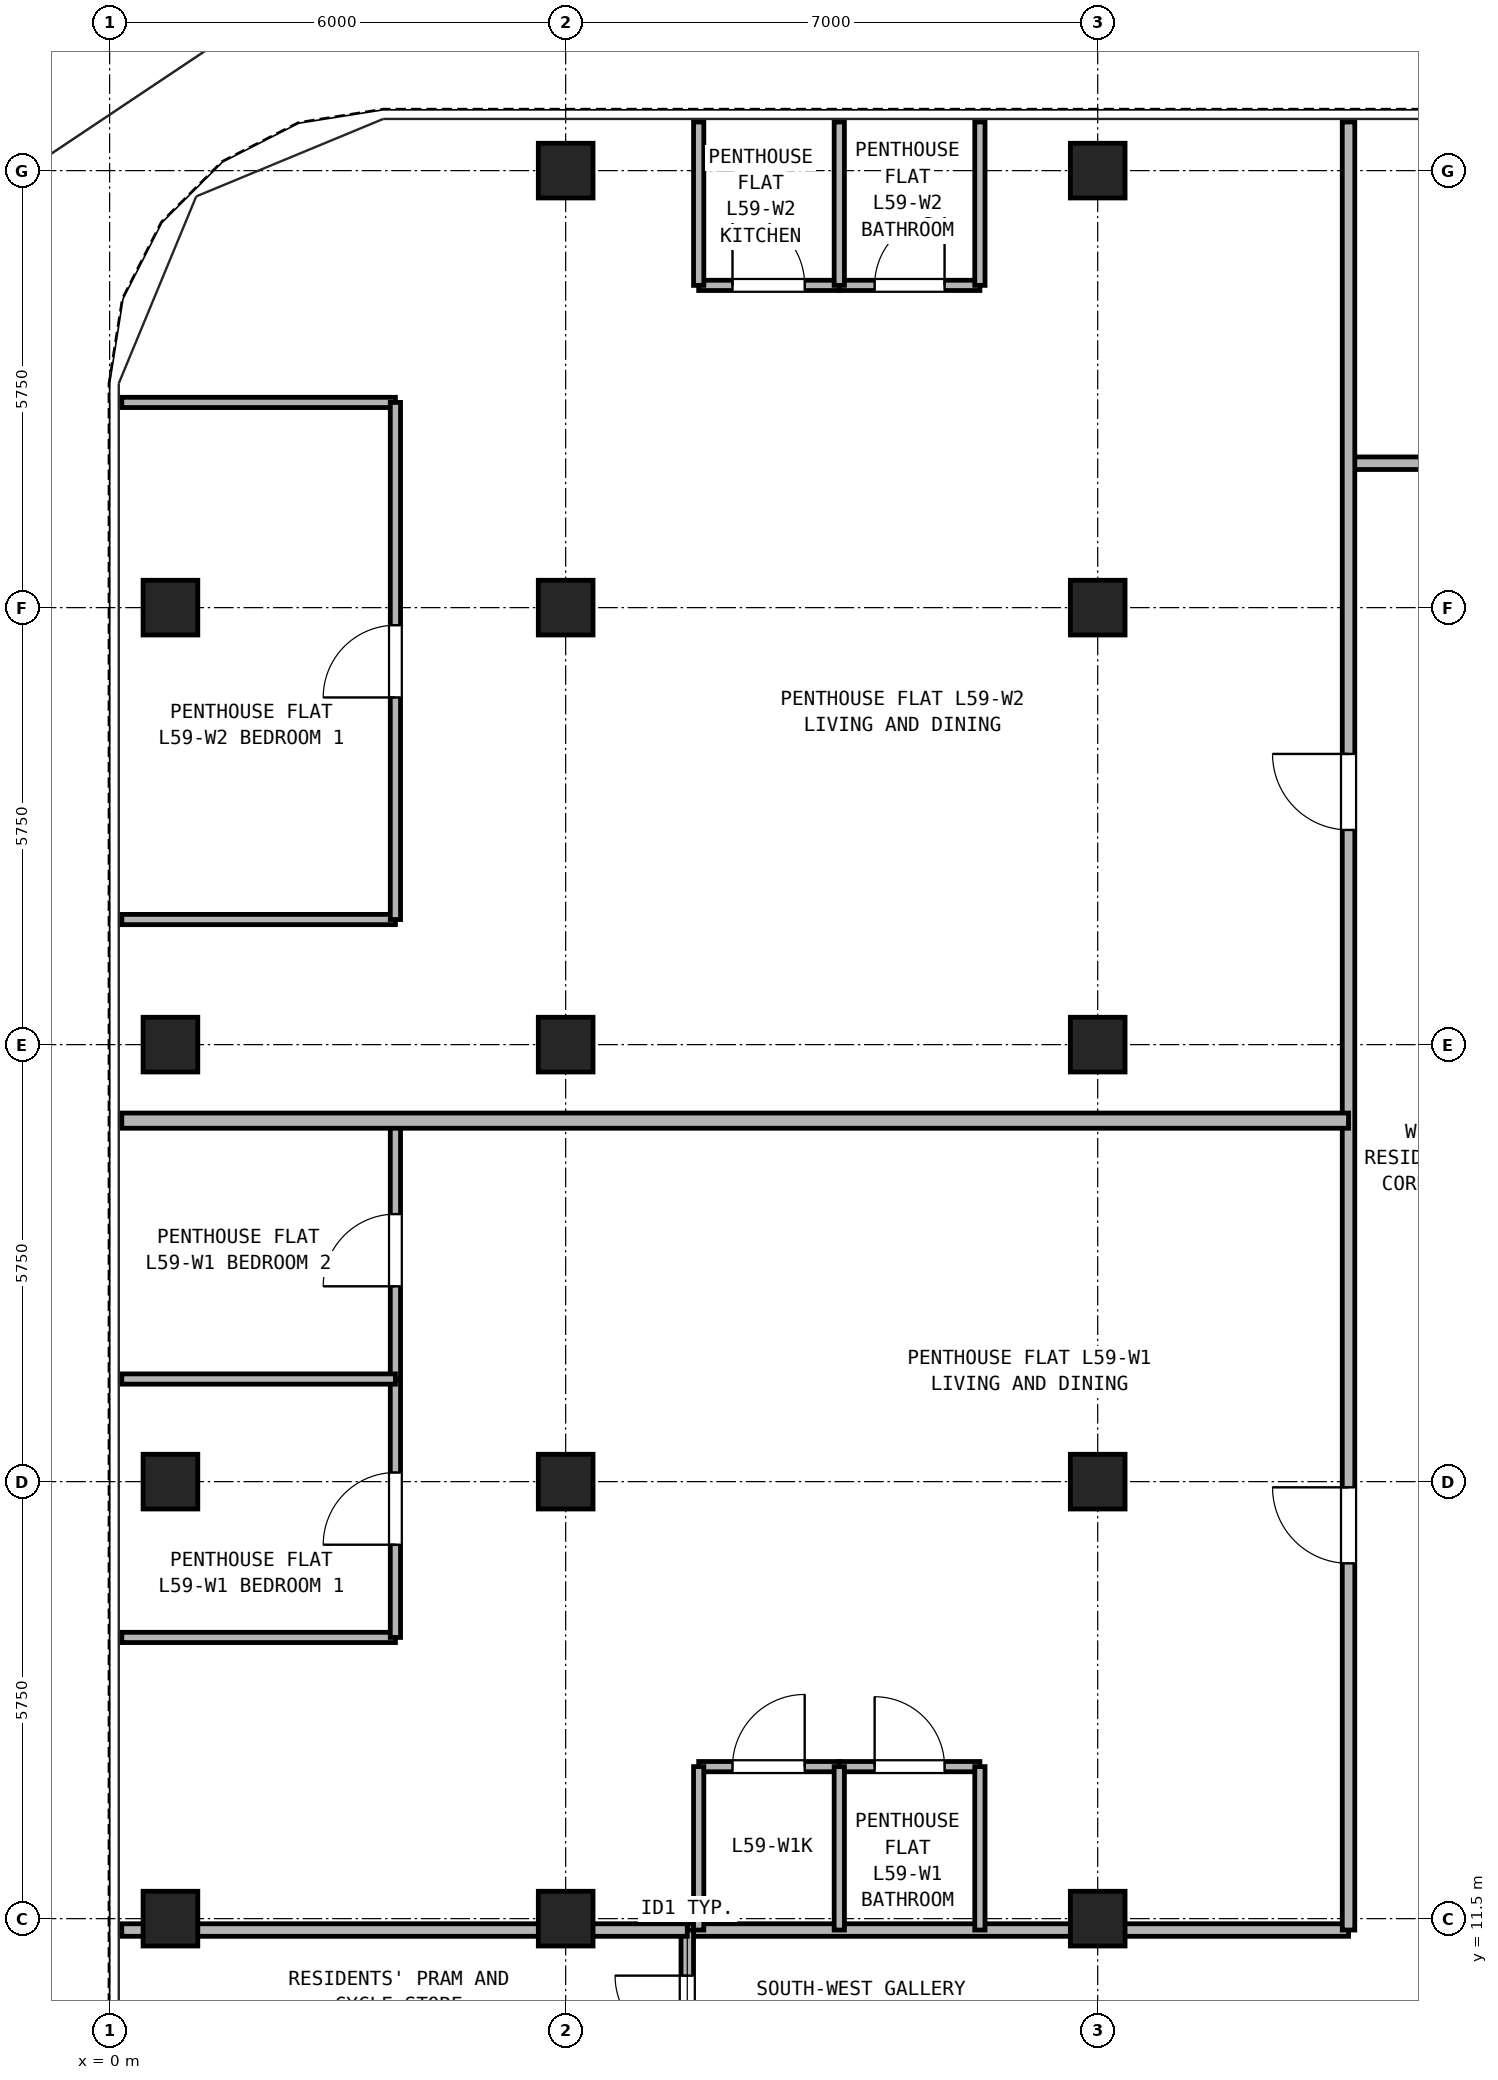
"""IFC4 building model, lengths in metres.
Left out: names, types, materials, properties, quantities, classifications, styles, units other than length and angle.
Written with IfcOpenShell. Run it as: python <this file> out.ifc"""

import sys

from ifc_helpers import new_model, si_unit, direction, frame, frame_2d, origin, origin_2d, place, context, subcontext, project, spatial, rectangle, hollow_rectangle, extrude, source, transform, mapped, element, fill, save


model = new_model("IFC4")
c1 = context("Model", 3, precision=1e-05, world=origin(), true_north=direction((0.0, 1.0)))
c2 = subcontext(c1, "Body", "Model", "MODEL_VIEW")
j1 = project(units=[si_unit("LENGTHUNIT", "METRE"), si_unit("PLANEANGLEUNIT", "RADIAN")], contexts=[c1])
p1 = place(None, origin())
s1 = spatial("IfcSite", under=j1, at=p1, CompositionType="ELEMENT")
p2 = place(p1, origin())
s2 = spatial("IfcBuilding", under=s1, at=p2, CompositionType="ELEMENT")
p3 = place(p2, frame((0.0, 0.0, 209.2)))
s3 = spatial("IfcBuildingStorey", under=s2, at=p3, CompositionType="ELEMENT", Elevation=209.2)
m1 = source(origin(), c2, "Body", "SweptSolid", [
    extrude(hollow_rectangle(XDim=0.72, YDim=0.72, WallThickness=0.04, at=origin_2d()), origin(), (0.0, 0.0, 1.0), 2.95),
])
for number, where, z_axis, x_axis in (
    (1, (6.0, 34.5, 0.0), (0.0, 0.0, 1.0), (1.0, 0.0, 0.0)),
    (2, (13.0, 34.5, 0.0), (0.0, 0.0, 1.0), (1.0, 0.0, 0.0)),
    (3, (0.8, 11.5, 0.0), (0.0, 0.0, 1.0), (1.0, 0.0, 0.0)),
    (4, (0.8, 17.25, 0.0), (0.0, 0.0, 1.0), (1.0, 0.0, 0.0)),
    (5, (0.8, 23.0, 0.0), (0.0, 0.0, 1.0), (1.0, 0.0, 0.0)),
    (6, (0.8, 28.75, 0.0), (0.0, 0.0, 1.0), (1.0, 0.0, 0.0)),
    (7, (6.0, 11.5, 0.0), (0.0, 0.0, 1.0), (1.0, 0.0, 0.0)),
    (8, (6.0, 17.25, 0.0), (0.0, 0.0, 1.0), (1.0, 0.0, 0.0)),
    (9, (6.0, 23.0, 0.0), (0.0, 0.0, 1.0), (1.0, 0.0, 0.0)),
    (10, (6.0, 28.75, 0.0), (0.0, 0.0, 1.0), (1.0, 0.0, 0.0)),
    (11, (13.0, 11.5, 0.0), (0.0, 0.0, 1.0), (1.0, 0.0, 0.0)),
    (12, (13.0, 17.25, 0.0), (0.0, 0.0, 1.0), (1.0, 0.0, 0.0)),
    (13, (13.0, 23.0, 0.0), (0.0, 0.0, 1.0), (1.0, 0.0, 0.0)),
    (14, (13.0, 28.75, 0.0), (0.0, 0.0, 1.0), (1.0, 0.0, 0.0)),
):
    element("IfcColumn", number, at=place(p3, frame(where, z_axis=z_axis, x_axis=x_axis)), inside=s3, PredefinedType="COLUMN", context=c2, shape_type="MappedRepresentation", body=[
        mapped(m1, transform((0.0, 0.0, 0.0), x_axis=(1.0, 0.0, 0.0), y_axis=(0.0, 1.0, 0.0), z_axis=(0.0, 0.0, 1.0), scale=1.0)),
    ])
p4 = place(p3, frame((7.6, 11.35, 0.0), z_axis=(0.0, 0.0, 1.0), x_axis=(1.0, 0.0, 0.0)))
e15 = element("IfcWall", 15, at=p4, inside=s3, PredefinedType="PARTITIONING", context=c2, shape_type="SweptSolid", body=[
    extrude(rectangle(XDim=8.7, YDim=0.165, at=frame_2d((4.35, 0.0))), origin(), (0.0, 0.0, 1.0), 2.323),
])
p5 = place(p3, frame((7.6, 9.35, 0.0), z_axis=(0.0, 0.0, 1.0), x_axis=(0.0, 1.0, 0.0)))
e16 = element("IfcWall", 16, at=p5, inside=s3, PredefinedType="PARTITIONING", context=c2, shape_type="SweptSolid", body=[
    extrude(rectangle(XDim=2.0, YDim=0.165, at=frame_2d((1.0, 0.0))), origin(), (0.0, 0.0, 1.0), 2.95),
])
p6 = place(p5, frame((0.45, 0.0, 0.0)))
e17 = element("IfcOpeningElement", 17, at=p6, cuts=e16, PredefinedType="OPENING", context=c2, shape_type="SweptSolid", body=[
    extrude(rectangle(XDim=0.95, YDim=2.15, at=frame_2d((0.475, 1.075))), frame((0.0, 0.093, 0.0), z_axis=(0.0, -1.0, 0.0), x_axis=(1.0, 0.0, 0.0)), (0.0, 0.0, 1.0), 0.185),
])
p7 = place(p3, frame((16.3, 30.65, 0.0), z_axis=(0.0, 0.0, 1.0), x_axis=(1.0, 0.0, 0.0)))
e18 = element("IfcWall", 18, at=p7, inside=s3, PredefinedType="PARTITIONING", context=c2, shape_type="SweptSolid", body=[
    extrude(rectangle(XDim=14.4, YDim=0.165, at=frame_2d((7.2, 0.0))), origin(), (0.0, 0.0, 1.0), 2.95),
])
p8 = place(p7, frame((3.1, 0.0, 0.0)))
e19 = element("IfcOpeningElement", 19, at=p8, cuts=e18, PredefinedType="OPENING", context=c2, shape_type="SweptSolid", body=[
    extrude(rectangle(XDim=0.95, YDim=2.15, at=frame_2d((0.475, 1.075))), frame((0.0, 0.093, 0.0), z_axis=(0.0, -1.0, 0.0), x_axis=(1.0, 0.0, 0.0)), (0.0, 0.0, 1.0), 0.185),
])
p9 = place(p7, frame((8.0, 0.0, 0.0)))
e20 = element("IfcOpeningElement", 20, at=p9, cuts=e18, PredefinedType="OPENING", context=c2, shape_type="SweptSolid", body=[
    extrude(rectangle(XDim=0.95, YDim=2.15, at=frame_2d((0.475, 1.075))), frame((0.0, 0.093, 0.0), z_axis=(0.0, -1.0, 0.0), x_axis=(1.0, 0.0, 0.0)), (0.0, 0.0, 1.0), 0.185),
])
p10 = place(p7, frame((11.6, 0.0, 0.0)))
e21 = element("IfcOpeningElement", 21, at=p10, cuts=e18, PredefinedType="OPENING", context=c2, shape_type="SweptSolid", body=[
    extrude(rectangle(XDim=0.92, YDim=2.1, at=frame_2d((0.46, 1.05))), frame((0.0, 0.093, 0.0), z_axis=(0.0, -1.0, 0.0), x_axis=(1.0, 0.0, 0.0)), (0.0, 0.0, 1.0), 0.185),
])
p11 = place(p3, frame((16.3, 11.35, 0.0), z_axis=(0.0, 0.0, 1.0), x_axis=(0.0, 1.0, 0.0)))
e22 = element("IfcWall", 22, at=p11, inside=s3, PredefinedType="PARTITIONING", context=c2, shape_type="SweptSolid", body=[
    extrude(rectangle(XDim=23.79, YDim=0.165, at=frame_2d((11.895, 0.0))), origin(), (0.0, 0.0, 1.0), 2.95),
])
p12 = place(p11, frame((4.825, 0.0, 0.0)))
e23 = element("IfcOpeningElement", 23, at=p12, cuts=e22, PredefinedType="OPENING", context=c2, shape_type="SweptSolid", body=[
    extrude(rectangle(XDim=1.0, YDim=2.15, at=frame_2d((0.5, 1.075))), frame((0.0, 0.093, 0.0), z_axis=(0.0, -1.0, 0.0), x_axis=(1.0, 0.0, 0.0)), (0.0, 0.0, 1.0), 0.185),
])
p13 = place(p11, frame((14.475, 0.0, 0.0)))
e24 = element("IfcOpeningElement", 24, at=p13, cuts=e22, PredefinedType="OPENING", context=c2, shape_type="SweptSolid", body=[
    extrude(rectangle(XDim=1.0, YDim=2.15, at=frame_2d((0.5, 1.075))), frame((0.0, 0.093, 0.0), z_axis=(0.0, -1.0, 0.0), x_axis=(1.0, 0.0, 0.0)), (0.0, 0.0, 1.0), 0.185),
])
p14 = place(p3, frame((0.16, 11.35, 0.0), z_axis=(0.0, 0.0, 1.0), x_axis=(1.0, 0.0, 0.0)))
e25 = element("IfcWall", 25, at=p14, inside=s3, PredefinedType="PARTITIONING", context=c2, shape_type="SweptSolid", body=[
    extrude(rectangle(XDim=7.44, YDim=0.165, at=frame_2d((3.72, 0.0))), origin(), (0.0, 0.0, 1.0), 2.323),
])
p15 = place(p3, frame((7.75, 13.5, 0.0), z_axis=(0.0, 0.0, 1.0), x_axis=(1.0, 0.0, 0.0)))
e26 = element("IfcWall", 26, at=p15, inside=s3, PredefinedType="PARTITIONING", context=c2, shape_type="SweptSolid", body=[
    extrude(rectangle(XDim=1.85, YDim=0.135, at=frame_2d((0.925, 0.0))), origin(), (0.0, 0.0, 1.0), 2.95),
])
p16 = place(p15, frame((0.445, 0.0, 0.0)))
e27 = element("IfcOpeningElement", 27, at=p16, cuts=e26, PredefinedType="OPENING", context=c2, shape_type="SweptSolid", body=[
    extrude(rectangle(XDim=0.95, YDim=2.15, at=frame_2d((0.475, 1.075))), frame((0.0, 0.077, 0.0), z_axis=(0.0, -1.0, 0.0), x_axis=(1.0, 0.0, 0.0)), (0.0, 0.0, 1.0), 0.155),
])
p17 = place(p3, frame((9.6, 13.5, 0.0), z_axis=(0.0, 0.0, 1.0), x_axis=(1.0, 0.0, 0.0)))
e28 = element("IfcWall", 28, at=p17, inside=s3, PredefinedType="PARTITIONING", context=c2, shape_type="SweptSolid", body=[
    extrude(rectangle(XDim=1.85, YDim=0.135, at=frame_2d((0.925, 0.0))), origin(), (0.0, 0.0, 1.0), 2.95),
])
p18 = place(p17, frame((0.465, 0.0, 0.0)))
e29 = element("IfcOpeningElement", 29, at=p18, cuts=e28, PredefinedType="OPENING", context=c2, shape_type="SweptSolid", body=[
    extrude(rectangle(XDim=0.92, YDim=2.1, at=frame_2d((0.46, 1.05))), frame((0.0, 0.077, 0.0), z_axis=(0.0, -1.0, 0.0), x_axis=(1.0, 0.0, 0.0)), (0.0, 0.0, 1.0), 0.155),
])
for number, where, z_axis, x_axis in (
    (30, (7.75, 11.35, 0.0), (0.0, 0.0, 1.0), (0.0, 1.0, 0.0)),
    (31, (9.6, 11.35, 0.0), (0.0, 0.0, 1.0), (0.0, 1.0, 0.0)),
    (32, (11.45, 11.35, 0.0), (0.0, 0.0, 1.0), (0.0, 1.0, 0.0)),
):
    element("IfcWall", number, at=place(p3, frame(where, z_axis=z_axis, x_axis=x_axis)), inside=s3, PredefinedType="PARTITIONING", context=c2, shape_type="SweptSolid", body=[
        extrude(rectangle(XDim=2.15, YDim=0.135, at=frame_2d((1.075, 0.0))), origin(), (0.0, 0.0, 1.0), 2.95),
    ])
p19 = place(p3, frame((0.16, 15.2, 0.0), z_axis=(0.0, 0.0, 1.0), x_axis=(1.0, 0.0, 0.0)))
e33 = element("IfcWall", 33, at=p19, inside=s3, PredefinedType="PARTITIONING", context=c2, shape_type="SweptSolid", body=[
    extrude(rectangle(XDim=3.6, YDim=0.135, at=frame_2d((1.8, 0.0))), origin(), (0.0, 0.0, 1.0), 2.95),
])
p20 = place(p3, frame((3.76, 15.2, 0.0), z_axis=(0.0, 0.0, 1.0), x_axis=(0.0, 1.0, 0.0)))
e34 = element("IfcWall", 34, at=p20, inside=s3, PredefinedType="PARTITIONING", context=c2, shape_type="SweptSolid", body=[
    extrude(rectangle(XDim=3.4, YDim=0.135, at=frame_2d((1.7, 0.0))), origin(), (0.0, 0.0, 1.0), 2.95),
])
p21 = place(p20, frame((1.22, 0.0, 0.0)))
e35 = element("IfcOpeningElement", 35, at=p21, cuts=e34, PredefinedType="OPENING", context=c2, shape_type="SweptSolid", body=[
    extrude(rectangle(XDim=0.95, YDim=2.15, at=frame_2d((0.475, 1.075))), frame((0.0, 0.077, 0.0), z_axis=(0.0, -1.0, 0.0), x_axis=(1.0, 0.0, 0.0)), (0.0, 0.0, 1.0), 0.155),
])
p22 = place(p3, frame((3.76, 18.6, 0.0), z_axis=(0.0, 0.0, 1.0), x_axis=(0.0, 1.0, 0.0)))
e36 = element("IfcWall", 36, at=p22, inside=s3, PredefinedType="PARTITIONING", context=c2, shape_type="SweptSolid", body=[
    extrude(rectangle(XDim=3.4, YDim=0.135, at=frame_2d((1.7, 0.0))), origin(), (0.0, 0.0, 1.0), 2.95),
])
p23 = place(p22, frame((1.22, 0.0, 0.0)))
e37 = element("IfcOpeningElement", 37, at=p23, cuts=e36, PredefinedType="OPENING", context=c2, shape_type="SweptSolid", body=[
    extrude(rectangle(XDim=0.95, YDim=2.15, at=frame_2d((0.475, 1.075))), frame((0.0, 0.077, 0.0), z_axis=(0.0, -1.0, 0.0), x_axis=(1.0, 0.0, 0.0)), (0.0, 0.0, 1.0), 0.155),
])
p24 = place(p3, frame((0.16, 18.6, 0.0), z_axis=(0.0, 0.0, 1.0), x_axis=(1.0, 0.0, 0.0)))
e38 = element("IfcWall", 38, at=p24, inside=s3, PredefinedType="PARTITIONING", context=c2, shape_type="SweptSolid", body=[
    extrude(rectangle(XDim=3.6, YDim=0.135, at=frame_2d((1.8, 0.0))), origin(), (0.0, 0.0, 1.0), 2.95),
])
p25 = place(p3, frame((0.16, 22.0, 0.0), z_axis=(0.0, 0.0, 1.0), x_axis=(1.0, 0.0, 0.0)))
e39 = element("IfcWall", 39, at=p25, inside=s3, PredefinedType="PARTITIONING", context=c2, shape_type="SweptSolid", body=[
    extrude(rectangle(XDim=16.14, YDim=0.2, at=frame_2d((8.07, 0.0))), origin(), (0.0, 0.0, 1.0), 2.95),
])
p26 = place(p3, frame((7.75, 32.99, 0.0), z_axis=(0.0, 0.0, 1.0), x_axis=(1.0, 0.0, 0.0)))
e40 = element("IfcWall", 40, at=p26, inside=s3, PredefinedType="PARTITIONING", context=c2, shape_type="SweptSolid", body=[
    extrude(rectangle(XDim=1.85, YDim=0.135, at=frame_2d((0.925, 0.0))), origin(), (0.0, 0.0, 1.0), 2.95),
])
p27 = place(p26, frame((0.445, 0.0, 0.0)))
e41 = element("IfcOpeningElement", 41, at=p27, cuts=e40, PredefinedType="OPENING", context=c2, shape_type="SweptSolid", body=[
    extrude(rectangle(XDim=0.95, YDim=2.15, at=frame_2d((0.475, 1.075))), frame((0.0, 0.077, 0.0), z_axis=(0.0, -1.0, 0.0), x_axis=(1.0, 0.0, 0.0)), (0.0, 0.0, 1.0), 0.155),
])
p28 = place(p3, frame((9.6, 32.99, 0.0), z_axis=(0.0, 0.0, 1.0), x_axis=(1.0, 0.0, 0.0)))
e42 = element("IfcWall", 42, at=p28, inside=s3, PredefinedType="PARTITIONING", context=c2, shape_type="SweptSolid", body=[
    extrude(rectangle(XDim=1.85, YDim=0.135, at=frame_2d((0.925, 0.0))), origin(), (0.0, 0.0, 1.0), 2.95),
])
p29 = place(p28, frame((0.465, 0.0, 0.0)))
e43 = element("IfcOpeningElement", 43, at=p29, cuts=e42, PredefinedType="OPENING", context=c2, shape_type="SweptSolid", body=[
    extrude(rectangle(XDim=0.92, YDim=2.1, at=frame_2d((0.46, 1.05))), frame((0.0, 0.077, 0.0), z_axis=(0.0, -1.0, 0.0), x_axis=(1.0, 0.0, 0.0)), (0.0, 0.0, 1.0), 0.155),
])
for number, where, z_axis, x_axis in (
    (44, (7.75, 32.99, 0.0), (0.0, 0.0, 1.0), (0.0, 1.0, 0.0)),
    (45, (9.6, 32.99, 0.0), (0.0, 0.0, 1.0), (0.0, 1.0, 0.0)),
    (46, (11.45, 32.99, 0.0), (0.0, 0.0, 1.0), (0.0, 1.0, 0.0)),
):
    element("IfcWall", number, at=place(p3, frame(where, z_axis=z_axis, x_axis=x_axis)), inside=s3, PredefinedType="PARTITIONING", context=c2, shape_type="SweptSolid", body=[
        extrude(rectangle(XDim=2.15, YDim=0.135, at=frame_2d((1.075, 0.0))), origin(), (0.0, 0.0, 1.0), 2.95),
    ])
for number, where, z_axis, x_axis in (
    (47, (0.16, 24.646, 0.0), (0.0, 0.0, 1.0), (1.0, 0.0, 0.0)),
    (48, (0.16, 31.45, 0.0), (0.0, 0.0, 1.0), (1.0, 0.0, 0.0)),
):
    element("IfcWall", number, at=place(p3, frame(where, z_axis=z_axis, x_axis=x_axis)), inside=s3, PredefinedType="PARTITIONING", context=c2, shape_type="SweptSolid", body=[
        extrude(rectangle(XDim=3.6, YDim=0.135, at=frame_2d((1.8, 0.0))), origin(), (0.0, 0.0, 1.0), 2.95),
    ])
p30 = place(p3, frame((3.76, 24.646, 0.0), z_axis=(0.0, 0.0, 1.0), x_axis=(0.0, 1.0, 0.0)))
e49 = element("IfcWall", 49, at=p30, inside=s3, PredefinedType="PARTITIONING", context=c2, shape_type="SweptSolid", body=[
    extrude(rectangle(XDim=6.804, YDim=0.135, at=frame_2d((3.402, 0.0))), origin(), (0.0, 0.0, 1.0), 2.95),
])
p31 = place(p30, frame((2.922, 0.0, 0.0)))
e50 = element("IfcOpeningElement", 50, at=p31, cuts=e49, PredefinedType="OPENING", context=c2, shape_type="SweptSolid", body=[
    extrude(rectangle(XDim=0.95, YDim=2.15, at=frame_2d((0.475, 1.075))), frame((0.0, 0.077, 0.0), z_axis=(0.0, -1.0, 0.0), x_axis=(1.0, 0.0, 0.0)), (0.0, 0.0, 1.0), 0.155),
])
p32 = place(p6, frame((0.95, 0.0, 0.0), z_axis=(0.0, 0.0, 1.0), x_axis=(-1.0, 0.0, 0.0)))
e51 = element("IfcDoor", 51, at=p32, inside=s3, OperationType="SINGLE_SWING_RIGHT", PredefinedType="DOOR", context=c2, shape_type="SweptSolid", body=[
    extrude(rectangle(XDim=0.95, YDim=2.15, at=frame_2d((0.475, 1.075))), frame((0.0, 0.025, 0.0), z_axis=(0.0, -1.0, 0.0), x_axis=(1.0, 0.0, 0.0)), (0.0, 0.0, 1.0), 0.05),
])
fill(e17, e51)
p33 = place(p16, origin())
e52 = element("IfcDoor", 52, at=p33, inside=s3, OperationType="SINGLE_SWING_RIGHT", PredefinedType="DOOR", context=c2, shape_type="SweptSolid", body=[
    extrude(rectangle(XDim=0.95, YDim=2.15, at=frame_2d((0.475, 1.075))), frame((0.0, 0.025, 0.0), z_axis=(0.0, -1.0, 0.0), x_axis=(1.0, 0.0, 0.0)), (0.0, 0.0, 1.0), 0.05),
])
fill(e27, e52)
p34 = place(p18, origin())
e53 = element("IfcDoor", 53, at=p34, inside=s3, OperationType="SINGLE_SWING_LEFT", PredefinedType="DOOR", context=c2, shape_type="SweptSolid", body=[
    extrude(rectangle(XDim=0.92, YDim=2.1, at=frame_2d((0.46, 1.05))), frame((0.0, 0.025, 0.0), z_axis=(0.0, -1.0, 0.0), x_axis=(1.0, 0.0, 0.0)), (0.0, 0.0, 1.0), 0.05),
])
fill(e29, e53)
p35 = place(p21, origin())
e54 = element("IfcDoor", 54, at=p35, inside=s3, OperationType="SINGLE_SWING_LEFT", PredefinedType="DOOR", context=c2, shape_type="SweptSolid", body=[
    extrude(rectangle(XDim=0.95, YDim=2.15, at=frame_2d((0.475, 1.075))), frame((0.0, 0.025, 0.0), z_axis=(0.0, -1.0, 0.0), x_axis=(1.0, 0.0, 0.0)), (0.0, 0.0, 1.0), 0.05),
])
fill(e35, e54)
p36 = place(p23, origin())
e55 = element("IfcDoor", 55, at=p36, inside=s3, OperationType="SINGLE_SWING_LEFT", PredefinedType="DOOR", context=c2, shape_type="SweptSolid", body=[
    extrude(rectangle(XDim=0.95, YDim=2.15, at=frame_2d((0.475, 1.075))), frame((0.0, 0.025, 0.0), z_axis=(0.0, -1.0, 0.0), x_axis=(1.0, 0.0, 0.0)), (0.0, 0.0, 1.0), 0.05),
])
fill(e37, e55)
p37 = place(p12, origin())
e56 = element("IfcDoor", 56, at=p37, inside=s3, OperationType="SINGLE_SWING_RIGHT", PredefinedType="DOOR", context=c2, shape_type="SweptSolid", body=[
    extrude(rectangle(XDim=1.0, YDim=2.15, at=frame_2d((0.5, 1.075))), frame((0.0, 0.025, 0.0), z_axis=(0.0, -1.0, 0.0), x_axis=(1.0, 0.0, 0.0)), (0.0, 0.0, 1.0), 0.05),
])
fill(e23, e56)
p38 = place(p27, frame((0.95, 0.0, 0.0), z_axis=(0.0, 0.0, 1.0), x_axis=(-1.0, 0.0, 0.0)))
e57 = element("IfcDoor", 57, at=p38, inside=s3, OperationType="SINGLE_SWING_LEFT", PredefinedType="DOOR", context=c2, shape_type="SweptSolid", body=[
    extrude(rectangle(XDim=0.95, YDim=2.15, at=frame_2d((0.475, 1.075))), frame((0.0, 0.025, 0.0), z_axis=(0.0, -1.0, 0.0), x_axis=(1.0, 0.0, 0.0)), (0.0, 0.0, 1.0), 0.05),
])
fill(e41, e57)
p39 = place(p29, frame((0.92, 0.0, 0.0), z_axis=(0.0, 0.0, 1.0), x_axis=(-1.0, 0.0, 0.0)))
e58 = element("IfcDoor", 58, at=p39, inside=s3, OperationType="SINGLE_SWING_RIGHT", PredefinedType="DOOR", context=c2, shape_type="SweptSolid", body=[
    extrude(rectangle(XDim=0.92, YDim=2.1, at=frame_2d((0.46, 1.05))), frame((0.0, 0.025, 0.0), z_axis=(0.0, -1.0, 0.0), x_axis=(1.0, 0.0, 0.0)), (0.0, 0.0, 1.0), 0.05),
])
fill(e43, e58)
p40 = place(p31, origin())
e59 = element("IfcDoor", 59, at=p40, inside=s3, OperationType="SINGLE_SWING_LEFT", PredefinedType="DOOR", context=c2, shape_type="SweptSolid", body=[
    extrude(rectangle(XDim=0.95, YDim=2.15, at=frame_2d((0.475, 1.075))), frame((0.0, 0.025, 0.0), z_axis=(0.0, -1.0, 0.0), x_axis=(1.0, 0.0, 0.0)), (0.0, 0.0, 1.0), 0.05),
])
fill(e50, e59)
p41 = place(p13, origin())
e60 = element("IfcDoor", 60, at=p41, inside=s3, OperationType="SINGLE_SWING_RIGHT", PredefinedType="DOOR", context=c2, shape_type="SweptSolid", body=[
    extrude(rectangle(XDim=1.0, YDim=2.15, at=frame_2d((0.5, 1.075))), frame((0.0, 0.025, 0.0), z_axis=(0.0, -1.0, 0.0), x_axis=(1.0, 0.0, 0.0)), (0.0, 0.0, 1.0), 0.05),
])
fill(e24, e60)
save(model, sys.argv[1])
